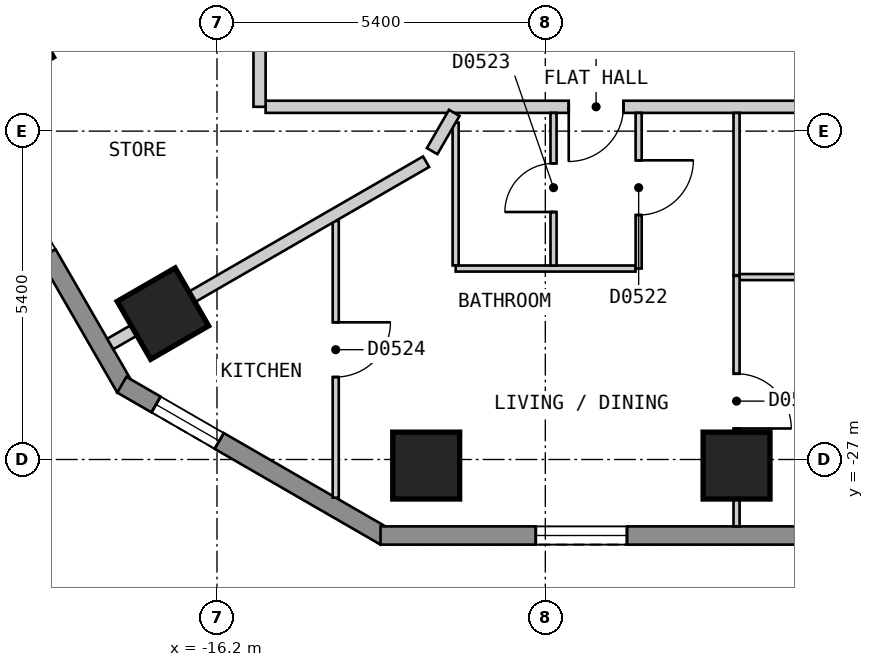
"""IFC4 building model, lengths in metres.
Left out: names, types, materials, properties, quantities, classifications, styles, units other than length and angle.
Written with IfcOpenShell. Run it as: python <this file> out.ifc"""

import sys

from ifc_helpers import new_model, si_unit, direction, frame, frame_2d, origin, origin_2d, place, context, subcontext, project, spatial, polyline, rectangle, outline, extrude, element, fill, save


model = new_model("IFC4")
c1 = context("Model", 3, precision=1e-05, world=origin(), true_north=direction((0.0, 1.0)))
c2 = subcontext(c1, "Body", "Model", "MODEL_VIEW")
j1 = project(units=[si_unit("LENGTHUNIT", "METRE"), si_unit("PLANEANGLEUNIT", "RADIAN")], contexts=[c1])
p1 = place(None, origin())
s1 = spatial("IfcSite", under=j1, at=p1, CompositionType="ELEMENT")
p2 = place(p1, origin())
s2 = spatial("IfcBuilding", under=s1, at=p2, CompositionType="ELEMENT")
p3 = place(p2, frame((0.0, 0.0, 56.4)))
s3 = spatial("IfcBuildingStorey", under=s2, at=p3, CompositionType="ELEMENT", Elevation=56.4)
for number, where, z_axis, x_axis in (
    (1, (-19.641, -20.181, 0.0), (0.0, 0.0, 1.0), (0.5, -0.866, 0.0)),
    (2, (-17.089, -24.601, 0.0), (0.0, 0.0, 1.0), (0.5, -0.866, 0.0)),
    (3, (-12.759, -27.1, 0.0), (0.0, 0.0, 1.0), (1.0, 0.0, 0.0)),
    (4, (-7.655, -27.1, 0.0), (0.0, 0.0, 1.0), (1.0, 0.0, 0.0)),
):
    element("IfcColumn", number, at=place(p3, frame(where, z_axis=z_axis, x_axis=x_axis)), inside=s3, PredefinedType="COLUMN", context=c2, shape_type="SweptSolid", body=[
        extrude(rectangle(XDim=1.1, YDim=1.1, at=origin_2d()), origin(), (0.0, 0.0, 1.0), 3.0),
    ])
p4 = place(p3, frame((-31.22, -2.425, 0.0), z_axis=(0.0, 0.0, 1.0), x_axis=(0.500001938803, -0.866024284413, 0.0)))
e5 = element("IfcWall", 5, at=p4, inside=s3, PredefinedType="SOLIDWALL", context=c2, shape_type="SweptSolid", body=[
    extrude(outline(polyline([(0.0, -0.15), (27.02, -0.15), (26.94, 0.15), (0.08, 0.15), (0.0, -0.15)])), origin(), (0.0, 0.0, 1.0), 2.7),
])
p5 = place(p4, frame((2.553, 0.0, 0.15)))
e6 = element("IfcOpeningElement", 6, at=p5, cuts=e5, PredefinedType="OPENING", context=c2, shape_type="SweptSolid", body=[
    extrude(rectangle(XDim=1.5, YDim=2.1, at=frame_2d((0.75, 1.05))), frame((0.0, 0.16, 0.0), z_axis=(0.0, -1.0, 0.0), x_axis=(1.0, 0.0, 0.0)), (0.0, 0.0, 1.0), 0.32),
])
p6 = place(p4, frame((7.657, 0.0, 0.15)))
e7 = element("IfcOpeningElement", 7, at=p6, cuts=e5, PredefinedType="OPENING", context=c2, shape_type="SweptSolid", body=[
    extrude(rectangle(XDim=1.5, YDim=2.1, at=frame_2d((0.75, 1.05))), frame((0.0, 0.16, 0.0), z_axis=(0.0, -1.0, 0.0), x_axis=(1.0, 0.0, 0.0)), (0.0, 0.0, 1.0), 0.32),
])
p7 = place(p4, frame((12.761, 0.0, 0.15)))
e8 = element("IfcOpeningElement", 8, at=p7, cuts=e5, PredefinedType="OPENING", context=c2, shape_type="SweptSolid", body=[
    extrude(rectangle(XDim=1.5, YDim=2.1, at=frame_2d((0.75, 1.05))), frame((0.0, 0.16, 0.0), z_axis=(0.0, -1.0, 0.0), x_axis=(1.0, 0.0, 0.0)), (0.0, 0.0, 1.0), 0.32),
])
p8 = place(p4, frame((17.865, 0.0, 0.15)))
e9 = element("IfcOpeningElement", 9, at=p8, cuts=e5, PredefinedType="OPENING", context=c2, shape_type="SweptSolid", body=[
    extrude(rectangle(XDim=1.5, YDim=2.1, at=frame_2d((0.75, 1.05))), frame((0.0, 0.16, 0.0), z_axis=(0.0, -1.0, 0.0), x_axis=(1.0, 0.0, 0.0)), (0.0, 0.0, 1.0), 0.32),
])
p9 = place(p4, frame((22.969, 0.0, 0.15)))
e10 = element("IfcOpeningElement", 10, at=p9, cuts=e5, PredefinedType="OPENING", context=c2, shape_type="SweptSolid", body=[
    extrude(rectangle(XDim=1.5, YDim=2.1, at=frame_2d((0.75, 1.05))), frame((0.0, 0.16, 0.0), z_axis=(0.0, -1.0, 0.0), x_axis=(1.0, 0.0, 0.0)), (0.0, 0.0, 1.0), 0.32),
])
p10 = place(p3, frame((-17.765, -25.77, 0.0), z_axis=(0.0, 0.0, 1.0), x_axis=(0.866010750942, -0.50002537861, 0.0)))
e11 = element("IfcWall", 11, at=p10, inside=s3, PredefinedType="SOLIDWALL", context=c2, shape_type="SweptSolid", body=[
    extrude(outline(polyline([(0.0, -0.15), (5.0, -0.15), (4.919, 0.15), (0.08, 0.15), (0.0, -0.15)])), origin(), (0.0, 0.0, 1.0), 2.7),
])
p11 = place(p10, frame((0.65, 0.0, 0.15)))
e12 = element("IfcOpeningElement", 12, at=p11, cuts=e11, PredefinedType="OPENING", context=c2, shape_type="SweptSolid", body=[
    extrude(rectangle(XDim=1.2, YDim=2.1, at=frame_2d((0.6, 1.05))), frame((0.0, 0.16, 0.0), z_axis=(0.0, -1.0, 0.0), x_axis=(1.0, 0.0, 0.0)), (0.0, 0.0, 1.0), 0.32),
])
p12 = place(p3, frame((-13.51, -28.25, 0.0), z_axis=(0.0, 0.0, 1.0), x_axis=(1.0, 0.0, 0.0)))
e13 = element("IfcWall", 13, at=p12, inside=s3, PredefinedType="SOLIDWALL", context=c2, shape_type="SweptSolid", body=[
    extrude(outline(polyline([(0.0, -0.15), (27.02, -0.15), (26.94, 0.15), (0.08, 0.15), (0.0, -0.15)])), origin(), (0.0, 0.0, 1.0), 2.7),
])
p13 = place(p12, frame((2.553, 0.0, 0.15)))
e14 = element("IfcOpeningElement", 14, at=p13, cuts=e13, PredefinedType="OPENING", context=c2, shape_type="SweptSolid", body=[
    extrude(rectangle(XDim=1.5, YDim=2.1, at=frame_2d((0.75, 1.05))), frame((0.0, 0.16, 0.0), z_axis=(0.0, -1.0, 0.0), x_axis=(1.0, 0.0, 0.0)), (0.0, 0.0, 1.0), 0.32),
])
p14 = place(p12, frame((7.657, 0.0, 0.15)))
e15 = element("IfcOpeningElement", 15, at=p14, cuts=e13, PredefinedType="OPENING", context=c2, shape_type="SweptSolid", body=[
    extrude(rectangle(XDim=1.5, YDim=2.1, at=frame_2d((0.75, 1.05))), frame((0.0, 0.16, 0.0), z_axis=(0.0, -1.0, 0.0), x_axis=(1.0, 0.0, 0.0)), (0.0, 0.0, 1.0), 0.32),
])
p15 = place(p12, frame((12.761, 0.0, 0.15)))
e16 = element("IfcOpeningElement", 16, at=p15, cuts=e13, PredefinedType="OPENING", context=c2, shape_type="SweptSolid", body=[
    extrude(rectangle(XDim=1.5, YDim=2.1, at=frame_2d((0.75, 1.05))), frame((0.0, 0.16, 0.0), z_axis=(0.0, -1.0, 0.0), x_axis=(1.0, 0.0, 0.0)), (0.0, 0.0, 1.0), 0.32),
])
p16 = place(p12, frame((17.865, 0.0, 0.15)))
e17 = element("IfcOpeningElement", 17, at=p16, cuts=e13, PredefinedType="OPENING", context=c2, shape_type="SweptSolid", body=[
    extrude(rectangle(XDim=1.5, YDim=2.1, at=frame_2d((0.75, 1.05))), frame((0.0, 0.16, 0.0), z_axis=(0.0, -1.0, 0.0), x_axis=(1.0, 0.0, 0.0)), (0.0, 0.0, 1.0), 0.32),
])
p17 = place(p12, frame((22.969, 0.0, 0.15)))
e18 = element("IfcOpeningElement", 18, at=p17, cuts=e13, PredefinedType="OPENING", context=c2, shape_type="SweptSolid", body=[
    extrude(rectangle(XDim=1.5, YDim=2.1, at=frame_2d((0.75, 1.05))), frame((0.0, 0.16, 0.0), z_axis=(0.0, -1.0, 0.0), x_axis=(1.0, 0.0, 0.0)), (0.0, 0.0, 1.0), 0.32),
])
p18 = place(p3, frame((-15.4, -21.2, 0.0), z_axis=(0.0, 0.0, 1.0), x_axis=(1.0, 0.0, 0.0)))
e19 = element("IfcWall", 19, at=p18, inside=s3, PredefinedType="PARTITIONING", context=c2, shape_type="SweptSolid", body=[
    extrude(rectangle(XDim=30.799, YDim=0.2, at=frame_2d((15.399, 0.0))), origin(), (0.0, 0.0, 1.0), 2.7),
])
p19 = place(p18, frame((4.985, 0.0, 0.0)))
e20 = element("IfcOpeningElement", 20, at=p19, cuts=e19, PredefinedType="OPENING", context=c2, shape_type="SweptSolid", body=[
    extrude(rectangle(XDim=0.9, YDim=2.1, at=frame_2d((0.45, 1.05))), frame((0.0, 0.11, 0.0), z_axis=(0.0, -1.0, 0.0), x_axis=(1.0, 0.0, 0.0)), (0.0, 0.0, 1.0), 0.22),
])
p20 = place(p18, frame((20.005, 0.0, 0.0)))
e21 = element("IfcOpeningElement", 21, at=p20, cuts=e19, PredefinedType="OPENING", context=c2, shape_type="SweptSolid", body=[
    extrude(rectangle(XDim=1.0, YDim=2.1, at=frame_2d((0.5, 1.05))), frame((0.0, 0.11, 0.0), z_axis=(0.0, -1.0, 0.0), x_axis=(1.0, 0.0, 0.0)), (0.0, 0.0, 1.0), 0.22),
])
p21 = place(p18, frame((24.916, 0.0, 0.0)))
e22 = element("IfcOpeningElement", 22, at=p21, cuts=e19, PredefinedType="OPENING", context=c2, shape_type="SweptSolid", body=[
    extrude(rectangle(XDim=0.9, YDim=2.1, at=frame_2d((0.45, 1.05))), frame((0.0, 0.11, 0.0), z_axis=(0.0, -1.0, 0.0), x_axis=(1.0, 0.0, 0.0)), (0.0, 0.0, 1.0), 0.22),
])
p22 = place(p3, frame((-15.5, -21.2, 0.0), z_axis=(0.0, 0.0, 1.0), x_axis=(0.0, 1.0, 0.0)))
e23 = element("IfcWall", 23, at=p22, inside=s3, PredefinedType="PARTITIONING", context=c2, shape_type="SweptSolid", body=[
    extrude(rectangle(XDim=3.294, YDim=0.2, at=frame_2d((1.647, 0.0))), origin(), (0.0, 0.0, 1.0), 2.7),
])
p23 = place(p22, frame((1.258, 0.0, 0.0)))
e24 = element("IfcOpeningElement", 24, at=p23, cuts=e23, PredefinedType="OPENING", context=c2, shape_type="SweptSolid", body=[
    extrude(rectangle(XDim=0.8, YDim=2.1, at=frame_2d((0.4, 1.05))), frame((0.0, 0.11, 0.0), z_axis=(0.0, -1.0, 0.0), x_axis=(1.0, 0.0, 0.0)), (0.0, 0.0, 1.0), 0.22),
])
p24 = place(p3, frame((-7.655, -21.3, 0.0), z_axis=(0.0, 0.0, 1.0), x_axis=(0.0, -1.0, 0.0)))
e25 = element("IfcWall", 25, at=p24, inside=s3, PredefinedType="PARTITIONING", context=c2, shape_type="SweptSolid", body=[
    extrude(rectangle(XDim=2.67, YDim=0.1, at=frame_2d((1.335, 0.0))), origin(), (0.0, 0.0, 1.0), 2.7),
])
p25 = place(p3, frame((-12.275, -21.46, 0.0), z_axis=(0.0, 0.0, 1.0), x_axis=(0.0, -1.0, 0.0)))
e26 = element("IfcWall", 26, at=p25, inside=s3, PredefinedType="PARTITIONING", context=c2, shape_type="SweptSolid", body=[
    extrude(rectangle(XDim=2.349, YDim=0.1, at=frame_2d((1.175, 0.0))), origin(), (0.0, 0.0, 1.0), 2.7),
])
p26 = place(p3, frame((-12.274, -23.86, 0.0), z_axis=(0.0, 0.0, 1.0), x_axis=(1.0, 0.0, 0.0)))
e27 = element("IfcWall", 27, at=p26, inside=s3, PredefinedType="PARTITIONING", context=c2, shape_type="SweptSolid", body=[
    extrude(rectangle(XDim=2.958, YDim=0.1, at=frame_2d((1.479, 0.0))), origin(), (0.0, 0.0, 1.0), 2.7),
])
p27 = place(p3, frame((-7.605, -24.0, 0.0), z_axis=(0.0, 0.0, 1.0), x_axis=(1.0, 0.0, 0.0)))
e28 = element("IfcWall", 28, at=p27, inside=s3, PredefinedType="PARTITIONING", context=c2, shape_type="SweptSolid", body=[
    extrude(rectangle(XDim=5.054, YDim=0.1, at=frame_2d((2.527, 0.0))), origin(), (0.0, 0.0, 1.0), 2.7),
])
p28 = place(p27, frame((2.102, 0.0, 0.0)))
e29 = element("IfcOpeningElement", 29, at=p28, cuts=e28, PredefinedType="OPENING", context=c2, shape_type="SweptSolid", body=[
    extrude(rectangle(XDim=0.8, YDim=2.1, at=frame_2d((0.4, 1.05))), frame((0.0, 0.06, 0.0), z_axis=(0.0, -1.0, 0.0), x_axis=(1.0, 0.0, 0.0)), (0.0, 0.0, 1.0), 0.12),
])
p29 = place(p3, frame((-7.655, -28.1, 0.0), z_axis=(0.0, 0.0, 1.0), x_axis=(0.0, 1.0, 0.0)))
e30 = element("IfcWall", 30, at=p29, inside=s3, PredefinedType="PARTITIONING", context=c2, shape_type="SweptSolid", body=[
    extrude(rectangle(XDim=4.12, YDim=0.1, at=frame_2d((2.06, 0.0))), origin(), (0.0, 0.0, 1.0), 2.7),
])
p30 = place(p29, frame((1.61, 0.0, 0.0)))
e31 = element("IfcOpeningElement", 31, at=p30, cuts=e30, PredefinedType="OPENING", context=c2, shape_type="SweptSolid", body=[
    extrude(rectangle(XDim=0.9, YDim=2.1, at=frame_2d((0.45, 1.05))), frame((0.0, 0.06, 0.0), z_axis=(0.0, -1.0, 0.0), x_axis=(1.0, 0.0, 0.0)), (0.0, 0.0, 1.0), 0.12),
])
p31 = place(p3, frame((-9.265, -23.859, 0.0), z_axis=(0.0, 0.0, 1.0), x_axis=(0.0, 1.0, 0.0)))
e32 = element("IfcWall", 32, at=p31, inside=s3, PredefinedType="PARTITIONING", context=c2, shape_type="SweptSolid", body=[
    extrude(rectangle(XDim=2.559, YDim=0.1, at=frame_2d((1.279, 0.0))), origin(), (0.0, 0.0, 1.0), 2.7),
])
p32 = place(p31, frame((0.879, 0.0, 0.0)))
e33 = element("IfcOpeningElement", 33, at=p32, cuts=e32, PredefinedType="OPENING", context=c2, shape_type="SweptSolid", body=[
    extrude(rectangle(XDim=0.9, YDim=2.1, at=frame_2d((0.45, 1.05))), frame((0.0, 0.06, 0.0), z_axis=(0.0, -1.0, 0.0), x_axis=(1.0, 0.0, 0.0)), (0.0, 0.0, 1.0), 0.12),
])
p33 = place(p3, frame((-10.665, -23.81, 0.0), z_axis=(0.0, 0.0, 1.0), x_axis=(0.0, 1.0, 0.0)))
e34 = element("IfcWall", 34, at=p33, inside=s3, PredefinedType="PARTITIONING", context=c2, shape_type="SweptSolid", body=[
    extrude(rectangle(XDim=2.51, YDim=0.1, at=frame_2d((1.255, 0.0))), origin(), (0.0, 0.0, 1.0), 2.7),
])
p34 = place(p33, frame((0.88, 0.0, 0.0)))
e35 = element("IfcOpeningElement", 35, at=p34, cuts=e34, PredefinedType="OPENING", context=c2, shape_type="SweptSolid", body=[
    extrude(rectangle(XDim=0.8, YDim=2.1, at=frame_2d((0.4, 1.05))), frame((0.0, 0.06, 0.0), z_axis=(0.0, -1.0, 0.0), x_axis=(1.0, 0.0, 0.0)), (0.0, 0.0, 1.0), 0.12),
])
p35 = place(p3, frame((-14.247, -27.628, 0.0), z_axis=(0.0, 0.0, 1.0), x_axis=(0.0, 1.0, 0.0)))
e36 = element("IfcWall", 36, at=p35, inside=s3, PredefinedType="PARTITIONING", context=c2, shape_type="SweptSolid", body=[
    extrude(rectangle(XDim=4.552, YDim=0.1, at=frame_2d((2.276, 0.0))), origin(), (0.0, 0.0, 1.0), 2.7),
])
p36 = place(p35, frame((1.984, 0.0, 0.0)))
e37 = element("IfcOpeningElement", 37, at=p36, cuts=e36, PredefinedType="OPENING", context=c2, shape_type="SweptSolid", body=[
    extrude(rectangle(XDim=0.9, YDim=2.1, at=frame_2d((0.45, 1.05))), frame((0.0, 0.06, 0.0), z_axis=(0.0, -1.0, 0.0), x_axis=(1.0, 0.0, 0.0)), (0.0, 0.0, 1.0), 0.12),
])
p37 = place(p3, frame((-12.661, -21.929, 0.0), z_axis=(0.0, 0.0, 1.0), x_axis=(0.499683639304, 0.866207977689, 0.0)))
e38 = element("IfcWall", 38, at=p37, inside=s3, PredefinedType="PARTITIONING", context=c2, shape_type="SweptSolid", body=[
    extrude(rectangle(XDim=0.726, YDim=0.2, at=frame_2d((0.363, 0.0))), origin(), (0.0, 0.0, 1.0), 2.7),
])
p38 = place(p3, frame((-20.507, -20.681, 0.0), z_axis=(0.0, 0.0, 1.0), x_axis=(0.86602314875, 0.500003905814, 0.0)))
e39 = element("IfcWall", 39, at=p38, inside=s3, PredefinedType="PARTITIONING", context=c2, shape_type="SweptSolid", body=[
    extrude(rectangle(XDim=5.782, YDim=0.2, at=frame_2d((2.891, 0.0))), origin(), (0.0, 0.0, 1.0), 2.7),
])
p39 = place(p3, frame((-17.955, -25.101, 0.0), z_axis=(0.0, 0.0, 1.0), x_axis=(0.866080519133, 0.499904525262, 0.0)))
e40 = element("IfcWall", 40, at=p39, inside=s3, PredefinedType="PARTITIONING", context=c2, shape_type="SweptSolid", body=[
    extrude(rectangle(XDim=5.997, YDim=0.2, at=frame_2d((2.999, 0.0))), origin(), (0.0, 0.0, 1.0), 2.7),
])
p40 = place(p11, origin())
e41 = element("IfcWindow", 41, at=p40, inside=s3, PartitioningType="SINGLE_PANEL", PredefinedType="WINDOW", context=c2, shape_type="SweptSolid", body=[
    extrude(rectangle(XDim=1.2, YDim=2.1, at=frame_2d((0.6, 1.05))), frame((0.0, 0.03, 0.0), z_axis=(0.0, -1.0, 0.0), x_axis=(1.0, 0.0, 0.0)), (0.0, 0.0, 1.0), 0.06),
])
fill(e12, e41)
p41 = place(p13, origin())
e42 = element("IfcWindow", 42, at=p41, inside=s3, PartitioningType="SINGLE_PANEL", PredefinedType="WINDOW", context=c2, shape_type="SweptSolid", body=[
    extrude(rectangle(XDim=1.5, YDim=2.1, at=frame_2d((0.75, 1.05))), frame((0.0, 0.03, 0.0), z_axis=(0.0, -1.0, 0.0), x_axis=(1.0, 0.0, 0.0)), (0.0, 0.0, 1.0), 0.06),
])
fill(e14, e42)
p42 = place(p19, origin())
e43 = element("IfcDoor", 43, at=p42, inside=s3, OperationType="SINGLE_SWING_LEFT", PredefinedType="DOOR", context=c2, shape_type="SweptSolid", body=[
    extrude(rectangle(XDim=0.9, YDim=2.1, at=frame_2d((0.45, 1.05))), frame((0.0, 0.025, 0.0), z_axis=(0.0, -1.0, 0.0), x_axis=(1.0, 0.0, 0.0)), (0.0, 0.0, 1.0), 0.05),
])
fill(e20, e43)
p43 = place(p32, origin())
e44 = element("IfcDoor", 44, at=p43, inside=s3, OperationType="SINGLE_SWING_RIGHT", PredefinedType="DOOR", context=c2, shape_type="SweptSolid", body=[
    extrude(rectangle(XDim=0.9, YDim=2.1, at=frame_2d((0.45, 1.05))), frame((0.0, 0.025, 0.0), z_axis=(0.0, -1.0, 0.0), x_axis=(1.0, 0.0, 0.0)), (0.0, 0.0, 1.0), 0.05),
])
fill(e33, e44)
p44 = place(p34, origin())
e45 = element("IfcDoor", 45, at=p44, inside=s3, OperationType="SINGLE_SWING_LEFT", PredefinedType="DOOR", context=c2, shape_type="SweptSolid", body=[
    extrude(rectangle(XDim=0.8, YDim=2.1, at=frame_2d((0.4, 1.05))), frame((0.0, 0.025, 0.0), z_axis=(0.0, -1.0, 0.0), x_axis=(1.0, 0.0, 0.0)), (0.0, 0.0, 1.0), 0.05),
])
fill(e35, e45)
p45 = place(p36, origin())
e46 = element("IfcDoor", 46, at=p45, inside=s3, OperationType="SINGLE_SWING_RIGHT", PredefinedType="DOOR", context=c2, shape_type="SweptSolid", body=[
    extrude(rectangle(XDim=0.9, YDim=2.1, at=frame_2d((0.45, 1.05))), frame((0.0, 0.025, 0.0), z_axis=(0.0, -1.0, 0.0), x_axis=(1.0, 0.0, 0.0)), (0.0, 0.0, 1.0), 0.05),
])
fill(e37, e46)
p46 = place(p30, origin())
e47 = element("IfcDoor", 47, at=p46, inside=s3, OperationType="SINGLE_SWING_LEFT", PredefinedType="DOOR", context=c2, shape_type="SweptSolid", body=[
    extrude(rectangle(XDim=0.9, YDim=2.1, at=frame_2d((0.45, 1.05))), frame((0.0, 0.025, 0.0), z_axis=(0.0, -1.0, 0.0), x_axis=(1.0, 0.0, 0.0)), (0.0, 0.0, 1.0), 0.05),
])
fill(e31, e47)
save(model, sys.argv[1])
